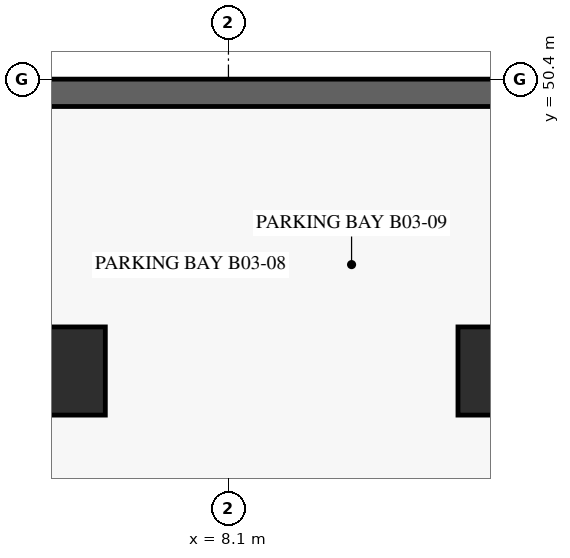
"""IFC4 building model, lengths in metres.
Left out: names, types, materials, properties, quantities, classifications, styles, units other than length and angle.
Written with IfcOpenShell. Run it as: python <this file> out.ifc"""

import sys

from ifc_helpers import new_model, si_unit, direction, frame, frame_2d, origin, origin_2d, place, context, subcontext, project, spatial, rectangle, extrude, source, transform, mapped, element, save


model = new_model("IFC4")
c1 = context("Model", 3, precision=1e-05, world=origin(), true_north=direction((0.0, 1.0)))
c2 = subcontext(c1, "Body", "Model", "MODEL_VIEW")
j1 = project(units=[si_unit("LENGTHUNIT", "METRE"), si_unit("PLANEANGLEUNIT", "RADIAN")], contexts=[c1])
p1 = place(None, origin())
s1 = spatial("IfcSite", under=j1, at=p1, CompositionType="ELEMENT")
p2 = place(p1, origin())
s2 = spatial("IfcBuilding", under=s1, at=p2, CompositionType="ELEMENT")
p3 = place(p2, frame((0.0, 0.0, -10.8)))
s3 = spatial("IfcBuildingStorey", under=s2, at=p3, CompositionType="ELEMENT", Elevation=-10.8)
p4 = place(p3, frame((64.575, 50.175, 0.0), z_axis=(0.0, 0.0, 1.0), x_axis=(-1.0, 0.0, 0.0)))
e1 = element("IfcWall", 1, at=p4, inside=s3, PredefinedType="USERDEFINED", context=c2, shape_type="SweptSolid", body=[
    extrude(rectangle(XDim=64.35, YDim=0.45, at=frame_2d((32.175, 0.0))), origin(), (0.0, 0.0, 1.0), 3.238),
])
m1 = source(origin(), c2, "Body", "SweptSolid", [
    extrude(rectangle(XDim=1.45, YDim=1.45, at=origin_2d()), origin(), (0.0, 0.0, 1.0), 3.24),
])
for number, where, z_axis, x_axis in (
    (2, (12.6, 45.6, 0.0), (0.0, 0.0, 1.0), (1.0, 0.0, 0.0)),
    (3, (5.35, 45.6, 0.0), (0.0, 0.0, 1.0), (1.0, 0.0, 0.0)),
):
    element("IfcColumn", number, at=place(p3, frame(where, z_axis=z_axis, x_axis=x_axis)), inside=s3, PredefinedType="COLUMN", context=c2, shape_type="MappedRepresentation", body=[
        mapped(m1, transform((0.0, 0.0, 0.0), scale=1.0)),
    ])
save(model, sys.argv[1])
